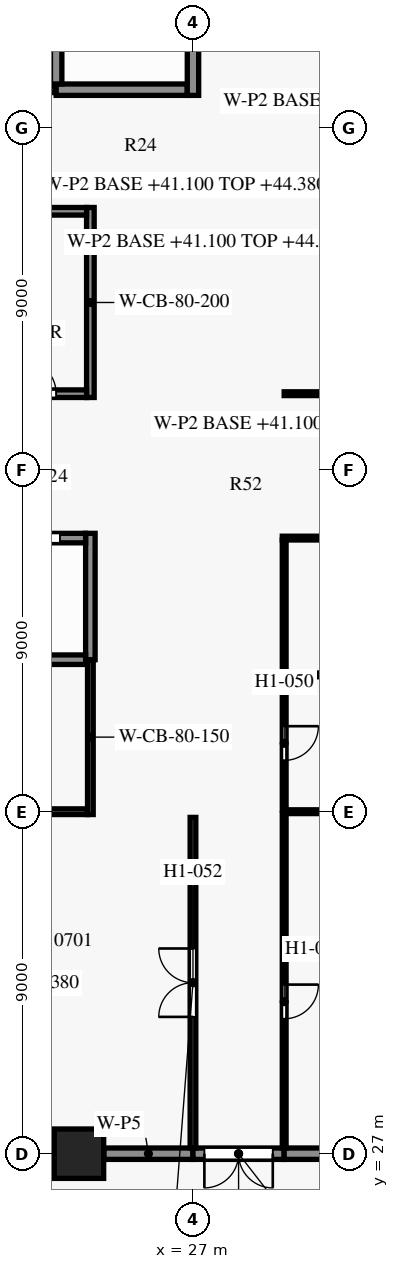
"""IFC4 building model, lengths in metres.
Left out: names, types, materials, properties, quantities, classifications, styles, units other than length and angle.
Written with IfcOpenShell. Run it as: python <this file> out.ifc"""

import sys

from ifc_helpers import new_model, si_unit, direction, frame, frame_2d, origin, origin_2d, place, context, subcontext, project, spatial, rectangle, extrude, element, fill, save


model = new_model("IFC4")
c1 = context("Model", 3, precision=1e-05, world=origin(), true_north=direction((0.0, 1.0)))
c2 = subcontext(c1, "Body", "Model", "MODEL_VIEW")
j1 = project(units=[si_unit("LENGTHUNIT", "METRE"), si_unit("PLANEANGLEUNIT", "RADIAN")], contexts=[c1])
p1 = place(None, origin())
s1 = spatial("IfcSite", under=j1, at=p1, CompositionType="ELEMENT")
p2 = place(p1, origin())
s2 = spatial("IfcBuilding", under=s1, at=p2, CompositionType="ELEMENT")
p3 = place(p2, frame((0.0, 0.0, 41.1)))
s3 = spatial("IfcBuildingStorey", under=s2, at=p3, CompositionType="ELEMENT", Elevation=41.1)
p4 = place(p3, frame((24.0, 27.0, 0.0), z_axis=(0.0, 0.0, 1.0), x_axis=(1.0, 0.0, 0.0)))
e1 = element("IfcColumn", 1, at=p4, inside=s3, PredefinedType="COLUMN", context=c2, shape_type="SweptSolid", body=[
    extrude(rectangle(XDim=1.3, YDim=1.3, at=origin_2d()), origin(), (0.0, 0.0, 1.0), 3.6),
])
p5 = place(p3, frame((12.4, 36.0, 0.0), z_axis=(0.0, 0.0, 1.0), x_axis=(1.0, 0.0, 0.0)))
e2 = element("IfcWall", 2, at=p5, inside=s3, PredefinedType="SHEAR", context=c2, shape_type="SweptSolid", body=[
    extrude(rectangle(XDim=11.825, YDim=0.15, at=frame_2d((5.913, 0.0))), origin(), (0.0, 0.0, 1.0), 3.3),
])
p6 = place(p5, frame((1.25, 0.0, 0.0)))
e3 = element("IfcOpeningElement", 3, at=p6, cuts=e2, PredefinedType="OPENING", context=c2, shape_type="SweptSolid", body=[
    extrude(rectangle(XDim=0.9, YDim=2.1, at=frame_2d((0.45, 1.05))), frame((0.0, 0.085, 0.0), z_axis=(0.0, -1.0, 0.0), x_axis=(1.0, 0.0, 0.0)), (0.0, 0.0, 1.0), 0.17),
])
p7 = place(p5, frame((5.2, 0.0, 0.0)))
e4 = element("IfcOpeningElement", 4, at=p7, cuts=e2, PredefinedType="OPENING", context=c2, shape_type="SweptSolid", body=[
    extrude(rectangle(XDim=0.9, YDim=2.1, at=frame_2d((0.45, 1.05))), frame((0.0, 0.085, 0.0), z_axis=(0.0, -1.0, 0.0), x_axis=(1.0, 0.0, 0.0)), (0.0, 0.0, 1.0), 0.17),
])
p8 = place(p5, frame((9.425, 0.0, 0.0)))
e5 = element("IfcOpeningElement", 5, at=p8, cuts=e2, PredefinedType="OPENING", context=c2, shape_type="SweptSolid", body=[
    extrude(rectangle(XDim=0.95, YDim=2.1, at=frame_2d((0.475, 1.05))), frame((0.0, 0.085, 0.0), z_axis=(0.0, -1.0, 0.0), x_axis=(1.0, 0.0, 0.0)), (0.0, 0.0, 1.0), 0.17),
])
p9 = place(p3, frame((8.1, 40.0, 0.0), z_axis=(0.0, 0.0, 1.0), x_axis=(1.0, 0.0, 0.0)))
e6 = element("IfcWall", 6, at=p9, inside=s3, PredefinedType="SHEAR", context=c2, shape_type="SweptSolid", body=[
    extrude(rectangle(XDim=16.075, YDim=0.25, at=frame_2d((8.038, 0.0))), origin(), (0.0, 0.0, 1.0), 3.3),
])
p10 = place(p3, frame((8.1, 43.2, 0.0), z_axis=(0.0, 0.0, 1.0), x_axis=(1.0, 0.0, 0.0)))
e7 = element("IfcWall", 7, at=p10, inside=s3, PredefinedType="SHEAR", context=c2, shape_type="SweptSolid", body=[
    extrude(rectangle(XDim=16.075, YDim=0.25, at=frame_2d((8.038, 0.0))), origin(), (0.0, 0.0, 1.0), 3.3),
])
p11 = place(p10, frame((14.3, 0.0, 0.0)))
e8 = element("IfcOpeningElement", 8, at=p11, cuts=e7, PredefinedType="OPENING", context=c2, shape_type="SweptSolid", body=[
    extrude(rectangle(XDim=1.1, YDim=2.1, at=frame_2d((0.55, 1.05))), frame((0.0, 0.135, 0.0), z_axis=(0.0, -1.0, 0.0), x_axis=(1.0, 0.0, 0.0)), (0.0, 0.0, 1.0), 0.27),
])
p12 = place(p10, frame((0.8, 0.0, 0.0)))
e9 = element("IfcOpeningElement", 9, at=p12, cuts=e7, PredefinedType="OPENING", context=c2, shape_type="SweptSolid", body=[
    extrude(rectangle(XDim=1.1, YDim=2.1, at=frame_2d((0.55, 1.05))), frame((0.0, 0.135, 0.0), z_axis=(0.0, -1.0, 0.0), x_axis=(1.0, 0.0, 0.0)), (0.0, 0.0, 1.0), 0.27),
])
p13 = place(p10, frame((3.5, 0.0, 0.0)))
e10 = element("IfcOpeningElement", 10, at=p13, cuts=e7, PredefinedType="OPENING", context=c2, shape_type="SweptSolid", body=[
    extrude(rectangle(XDim=1.1, YDim=2.1, at=frame_2d((0.55, 1.05))), frame((0.0, 0.135, 0.0), z_axis=(0.0, -1.0, 0.0), x_axis=(1.0, 0.0, 0.0)), (0.0, 0.0, 1.0), 0.27),
])
p14 = place(p10, frame((6.2, 0.0, 0.0)))
e11 = element("IfcOpeningElement", 11, at=p14, cuts=e7, PredefinedType="OPENING", context=c2, shape_type="SweptSolid", body=[
    extrude(rectangle(XDim=1.1, YDim=2.1, at=frame_2d((0.55, 1.05))), frame((0.0, 0.135, 0.0), z_axis=(0.0, -1.0, 0.0), x_axis=(1.0, 0.0, 0.0)), (0.0, 0.0, 1.0), 0.27),
])
p15 = place(p10, frame((8.9, 0.0, 0.0)))
e12 = element("IfcOpeningElement", 12, at=p15, cuts=e7, PredefinedType="OPENING", context=c2, shape_type="SweptSolid", body=[
    extrude(rectangle(XDim=1.1, YDim=2.1, at=frame_2d((0.55, 1.05))), frame((0.0, 0.135, 0.0), z_axis=(0.0, -1.0, 0.0), x_axis=(1.0, 0.0, 0.0)), (0.0, 0.0, 1.0), 0.27),
])
p16 = place(p10, frame((11.6, 0.0, 0.0)))
e13 = element("IfcOpeningElement", 13, at=p16, cuts=e7, PredefinedType="OPENING", context=c2, shape_type="SweptSolid", body=[
    extrude(rectangle(XDim=1.1, YDim=2.1, at=frame_2d((0.55, 1.05))), frame((0.0, 0.135, 0.0), z_axis=(0.0, -1.0, 0.0), x_axis=(1.0, 0.0, 0.0)), (0.0, 0.0, 1.0), 0.27),
])
p17 = place(p3, frame((21.6, 47.0, 0.0), z_axis=(0.0, 0.0, 1.0), x_axis=(1.0, 0.0, 0.0)))
e14 = element("IfcWall", 14, at=p17, inside=s3, PredefinedType="PARTITIONING", context=c2, shape_type="SweptSolid", body=[
    extrude(rectangle(XDim=2.6, YDim=0.2, at=frame_2d((1.3, 0.0))), origin(), (0.0, 0.0, 1.0), 3.3),
])
p18 = place(p17, frame((0.9, 0.0, 0.0)))
e15 = element("IfcOpeningElement", 15, at=p18, cuts=e14, PredefinedType="OPENING", context=c2, shape_type="SweptSolid", body=[
    extrude(rectangle(XDim=0.9, YDim=2.1, at=frame_2d((0.45, 1.05))), frame((0.0, 0.11, 0.0), z_axis=(0.0, -1.0, 0.0), x_axis=(1.0, 0.0, 0.0)), (0.0, 0.0, 1.0), 0.22),
])
p19 = place(p3, frame((21.6, 51.8, 0.0), z_axis=(0.0, 0.0, 1.0), x_axis=(1.0, 0.0, 0.0)))
e16 = element("IfcWall", 16, at=p19, inside=s3, PredefinedType="PARTITIONING", context=c2, shape_type="SweptSolid", body=[
    extrude(rectangle(XDim=2.6, YDim=0.2, at=frame_2d((1.3, 0.0))), origin(), (0.0, 0.0, 1.0), 3.3),
])
p20 = place(p3, frame((13.5, 55.0, 0.0), z_axis=(0.0, 0.0, 1.0), x_axis=(1.0, 0.0, 0.0)))
e17 = element("IfcWall", 17, at=p20, inside=s3, PredefinedType="PARTITIONING", context=c2, shape_type="SweptSolid", body=[
    extrude(rectangle(XDim=9.9, YDim=0.15, at=frame_2d((4.95, 0.0))), origin(), (0.0, 0.0, 1.0), 3.3),
])
p21 = place(p20, frame((4.45, 0.0, 0.0)))
e18 = element("IfcOpeningElement", 18, at=p21, cuts=e17, PredefinedType="OPENING", context=c2, shape_type="SweptSolid", body=[
    extrude(rectangle(XDim=1.0, YDim=2.1, at=frame_2d((0.5, 1.05))), frame((0.0, 0.085, 0.0), z_axis=(0.0, -1.0, 0.0), x_axis=(1.0, 0.0, 0.0)), (0.0, 0.0, 1.0), 0.17),
])
p22 = place(p3, frame((23.4, 55.0, 0.0), z_axis=(0.0, 0.0, 1.0), x_axis=(1.0, 0.0, 0.0)))
e19 = element("IfcWall", 19, at=p22, inside=s3, PredefinedType="SHEAR", context=c2, shape_type="SweptSolid", body=[
    extrude(rectangle(XDim=3.45, YDim=0.3, at=frame_2d((1.725, 0.0))), origin(), (0.0, 0.0, 1.0), 3.3),
])
p23 = place(p3, frame((23.4, 55.15, 0.0), z_axis=(0.0, 0.0, 1.0), x_axis=(0.0, 1.0, 0.0)))
e20 = element("IfcWall", 20, at=p23, inside=s3, PredefinedType="SHEAR", context=c2, shape_type="SweptSolid", body=[
    extrude(rectangle(XDim=8.0, YDim=0.3, at=frame_2d((4.0, 0.0))), origin(), (0.0, 0.0, 1.0), 3.3),
])
p24 = place(p3, frame((24.3, 35.925, 0.0), z_axis=(0.0, 0.0, 1.0), x_axis=(0.0, 1.0, 0.0)))
e21 = element("IfcWall", 21, at=p24, inside=s3, PredefinedType="SHEAR", context=c2, shape_type="SweptSolid", body=[
    extrude(rectangle(XDim=4.075, YDim=0.15, at=frame_2d((2.038, 0.0))), origin(), (0.0, 0.0, 1.0), 3.3),
])
p25 = place(p3, frame((24.3, 46.9, 0.0), z_axis=(0.0, 0.0, 1.0), x_axis=(0.0, 1.0, 0.0)))
e22 = element("IfcWall", 22, at=p25, inside=s3, PredefinedType="SHEAR", context=c2, shape_type="SweptSolid", body=[
    extrude(rectangle(XDim=5.0, YDim=0.2, at=frame_2d((2.5, 0.0))), origin(), (0.0, 0.0, 1.0), 3.3),
])
p26 = place(p3, frame((24.3, 40.0, 0.0), z_axis=(0.0, 0.0, 1.0), x_axis=(0.0, 1.0, 0.0)))
e23 = element("IfcWall", 23, at=p26, inside=s3, PredefinedType="SHEAR", context=c2, shape_type="SweptSolid", body=[
    extrude(rectangle(XDim=3.325, YDim=0.25, at=frame_2d((1.663, 0.0))), origin(), (0.0, 0.0, 1.0), 3.3),
])
p27 = place(p3, frame((27.0, 54.85, 0.0), z_axis=(0.0, 0.0, 1.0), x_axis=(0.0, 1.0, 0.0)))
e24 = element("IfcWall", 24, at=p27, inside=s3, PredefinedType="SHEAR", context=c2, shape_type="SweptSolid", body=[
    extrude(rectangle(XDim=8.35, YDim=0.3, at=frame_2d((4.175, 0.0))), origin(), (0.0, 0.0, 1.0), 3.3),
])
p28 = place(p27, frame((6.55, 0.0, 0.0)))
e25 = element("IfcOpeningElement", 25, at=p28, cuts=e24, PredefinedType="OPENING", context=c2, shape_type="SweptSolid", body=[
    extrude(rectangle(XDim=1.2, YDim=2.2, at=frame_2d((0.6, 1.1))), frame((0.0, 0.16, 0.0), z_axis=(0.0, -1.0, 0.0), x_axis=(1.0, 0.0, 0.0)), (0.0, 0.0, 1.0), 0.32),
])
p29 = place(p3, frame((23.345, 27.0, 0.0), z_axis=(0.0, 0.0, 1.0), x_axis=(-1.0, 0.0, 0.0)))
e26 = element("IfcWall", 26, at=p29, inside=s3, PredefinedType="PARTITIONING", context=c2, shape_type="SweptSolid", body=[
    extrude(rectangle(XDim=9.845, YDim=0.3, at=frame_2d((4.922, 0.0))), origin(), (0.0, 0.0, 1.0), 2.58),
])
p30 = place(p3, frame((27.0, 27.0, 0.0), z_axis=(0.0, 0.0, 1.0), x_axis=(-1.0, 0.0, 0.0)))
e27 = element("IfcWall", 27, at=p30, inside=s3, PredefinedType="PARTITIONING", context=c2, shape_type="SweptSolid", body=[
    extrude(rectangle(XDim=2.345, YDim=0.3, at=frame_2d((1.172, 0.0))), origin(), (0.0, 0.0, 1.0), 2.58),
])
p31 = place(p3, frame((29.4, 27.0, 0.0), z_axis=(0.0, 0.0, 1.0), x_axis=(-1.0, 0.0, 0.0)))
e28 = element("IfcWall", 28, at=p31, inside=s3, PredefinedType="PARTITIONING", context=c2, shape_type="SweptSolid", body=[
    extrude(rectangle(XDim=2.4, YDim=0.3, at=frame_2d((1.2, 0.0))), origin(), (0.0, 0.0, 1.0), 2.58),
])
p32 = place(p31, frame((0.3, 0.0, 0.0)))
e29 = element("IfcOpeningElement", 29, at=p32, cuts=e28, PredefinedType="OPENING", context=c2, shape_type="SweptSolid", body=[
    extrude(rectangle(XDim=1.8, YDim=2.1, at=frame_2d((0.9, 1.05))), frame((0.0, 0.16, 0.0), z_axis=(0.0, -1.0, 0.0), x_axis=(1.0, 0.0, 0.0)), (0.0, 0.0, 1.0), 0.32),
])
p33 = place(p3, frame((34.975, 27.0, 0.0), z_axis=(0.0, 0.0, 1.0), x_axis=(-1.0, 0.0, 0.0)))
e30 = element("IfcWall", 30, at=p33, inside=s3, PredefinedType="PARTITIONING", context=c2, shape_type="SweptSolid", body=[
    extrude(rectangle(XDim=5.575, YDim=0.3, at=frame_2d((2.788, 0.0))), origin(), (0.0, 0.0, 1.0), 2.58),
])
p34 = place(p3, frame((27.0, 27.15, 0.0), z_axis=(0.0, 0.0, 1.0), x_axis=(0.0, 1.0, 0.0)))
e31 = element("IfcWall", 31, at=p34, inside=s3, PredefinedType="PARTITIONING", context=c2, shape_type="SweptSolid", body=[
    extrude(rectangle(XDim=8.7, YDim=0.15, at=frame_2d((4.35, 0.0))), origin(), (0.0, 0.0, 1.0), 3.28),
])
p35 = place(p34, frame((3.45, 0.0, 0.0)))
e32 = element("IfcOpeningElement", 32, at=p35, cuts=e31, PredefinedType="OPENING", context=c2, shape_type="SweptSolid", body=[
    extrude(rectangle(XDim=1.8, YDim=2.1, at=frame_2d((0.9, 1.05))), frame((0.0, 0.085, 0.0), z_axis=(0.0, -1.0, 0.0), x_axis=(1.0, 0.0, 0.0)), (0.0, 0.0, 1.0), 0.17),
])
p36 = place(p3, frame((29.4, 35.95, 0.0), z_axis=(0.0, 0.0, 1.0), x_axis=(0.0, -1.0, 0.0)))
e33 = element("IfcWall", 33, at=p36, inside=s3, PredefinedType="PARTITIONING", context=c2, shape_type="SweptSolid", body=[
    extrude(rectangle(XDim=8.8, YDim=0.1, at=frame_2d((4.4, 0.0))), origin(), (0.0, 0.0, 1.0), 3.28),
])
p37 = place(p36, frame((4.5, 0.0, 0.0)))
e34 = element("IfcOpeningElement", 34, at=p37, cuts=e33, PredefinedType="OPENING", context=c2, shape_type="SweptSolid", body=[
    extrude(rectangle(XDim=0.9, YDim=2.1, at=frame_2d((0.45, 1.05))), frame((0.0, 0.06, 0.0), z_axis=(0.0, -1.0, 0.0), x_axis=(1.0, 0.0, 0.0)), (0.0, 0.0, 1.0), 0.12),
])
p38 = place(p3, frame((36.0, 36.0, 0.0), z_axis=(0.0, 0.0, 1.0), x_axis=(-1.0, 0.0, 0.0)))
e35 = element("IfcWall", 35, at=p38, inside=s3, PredefinedType="PARTITIONING", context=c2, shape_type="SweptSolid", body=[
    extrude(rectangle(XDim=6.55, YDim=0.1, at=frame_2d((3.275, 0.0))), origin(), (0.0, 0.0, 1.0), 2.58),
])
p39 = place(p3, frame((29.4, 39.55, 0.0), z_axis=(0.0, 0.0, 1.0), x_axis=(0.0, -1.0, 0.0)))
e36 = element("IfcWall", 36, at=p39, inside=s3, PredefinedType="PARTITIONING", context=c2, shape_type="SweptSolid", body=[
    extrude(rectangle(XDim=3.5, YDim=0.1, at=frame_2d((1.75, 0.0))), origin(), (0.0, 0.0, 1.0), 3.28),
])
p40 = place(p39, frame((1.3, 0.0, 0.0)))
e37 = element("IfcOpeningElement", 37, at=p40, cuts=e36, PredefinedType="OPENING", context=c2, shape_type="SweptSolid", body=[
    extrude(rectangle(XDim=0.9, YDim=2.1, at=frame_2d((0.45, 1.05))), frame((0.0, 0.06, 0.0), z_axis=(0.0, -1.0, 0.0), x_axis=(1.0, 0.0, 0.0)), (0.0, 0.0, 1.0), 0.12),
])
p41 = place(p3, frame((35.345, 39.6, 0.0), z_axis=(0.0, 0.0, 1.0), x_axis=(-1.0, 0.0, 0.0)))
e38 = element("IfcWall", 38, at=p41, inside=s3, PredefinedType="PARTITIONING", context=c2, shape_type="SweptSolid", body=[
    extrude(rectangle(XDim=5.895, YDim=0.1, at=frame_2d((2.948, 0.0))), origin(), (0.0, 0.0, 1.0), 3.28),
])
p42 = place(p3, frame((29.4, 43.15, 0.0), z_axis=(0.0, 0.0, 1.0), x_axis=(0.0, -1.0, 0.0)))
e39 = element("IfcWall", 39, at=p42, inside=s3, PredefinedType="PARTITIONING", context=c2, shape_type="SweptSolid", body=[
    extrude(rectangle(XDim=3.5, YDim=0.1, at=frame_2d((1.75, 0.0))), origin(), (0.0, 0.0, 1.0), 3.28),
])
p43 = place(p3, frame((35.85, 43.2, 0.0), z_axis=(0.0, 0.0, 1.0), x_axis=(-1.0, 0.0, 0.0)))
e40 = element("IfcWall", 40, at=p43, inside=s3, PredefinedType="PARTITIONING", context=c2, shape_type="SweptSolid", body=[
    extrude(rectangle(XDim=6.5, YDim=0.1, at=frame_2d((3.25, 0.0))), origin(), (0.0, 0.0, 1.0), 3.28),
])
p44 = place(p43, frame((2.7, 0.0, 0.0)))
e41 = element("IfcOpeningElement", 41, at=p44, cuts=e40, PredefinedType="OPENING", context=c2, shape_type="SweptSolid", body=[
    extrude(rectangle(XDim=0.9, YDim=2.1, at=frame_2d((0.45, 1.05))), frame((0.0, 0.06, 0.0), z_axis=(0.0, -1.0, 0.0), x_axis=(1.0, 0.0, 0.0)), (0.0, 0.0, 1.0), 0.12),
])
p45 = place(p3, frame((29.4, 47.0, 0.0), z_axis=(0.0, 0.0, 1.0), x_axis=(1.0, 0.0, 0.0)))
e42 = element("IfcWall", 42, at=p45, inside=s3, PredefinedType="PARTITIONING", context=c2, shape_type="SweptSolid", body=[
    extrude(rectangle(XDim=2.1, YDim=0.1, at=frame_2d((1.05, 0.0))), origin(), (0.0, 0.0, 1.0), 3.28),
])
p46 = place(p18, origin())
e43 = element("IfcDoor", 43, at=p46, inside=s3, OperationType="SINGLE_SWING_LEFT", PredefinedType="DOOR", context=c2, shape_type="SweptSolid", body=[
    extrude(rectangle(XDim=0.9, YDim=2.1, at=frame_2d((0.45, 1.05))), frame((0.0, 0.025, 0.0), z_axis=(0.0, -1.0, 0.0), x_axis=(1.0, 0.0, 0.0)), (0.0, 0.0, 1.0), 0.05),
])
fill(e15, e43)
p47 = place(p11, origin())
e44 = element("IfcDoor", 44, at=p47, inside=s3, OperationType="DOUBLE_DOOR_SLIDING", PredefinedType="DOOR", context=c2, shape_type="SweptSolid", body=[
    extrude(rectangle(XDim=1.1, YDim=2.1, at=frame_2d((0.55, 1.05))), frame((0.0, 0.025, 0.0), z_axis=(0.0, -1.0, 0.0), x_axis=(1.0, 0.0, 0.0)), (0.0, 0.0, 1.0), 0.05),
])
fill(e8, e44)
p48 = place(p40, origin())
e45 = element("IfcDoor", 45, at=p48, inside=s3, OperationType="SINGLE_SWING_RIGHT", PredefinedType="DOOR", context=c2, shape_type="SweptSolid", body=[
    extrude(rectangle(XDim=0.9, YDim=2.1, at=frame_2d((0.45, 1.05))), frame((0.0, 0.025, 0.0), z_axis=(0.0, -1.0, 0.0), x_axis=(1.0, 0.0, 0.0)), (0.0, 0.0, 1.0), 0.05),
])
fill(e37, e45)
p49 = place(p37, origin())
e46 = element("IfcDoor", 46, at=p49, inside=s3, OperationType="SINGLE_SWING_LEFT", PredefinedType="DOOR", context=c2, shape_type="SweptSolid", body=[
    extrude(rectangle(XDim=0.9, YDim=2.1, at=frame_2d((0.45, 1.05))), frame((0.0, 0.025, 0.0), z_axis=(0.0, -1.0, 0.0), x_axis=(1.0, 0.0, 0.0)), (0.0, 0.0, 1.0), 0.05),
])
fill(e34, e46)
p50 = place(p35, origin())
e47 = element("IfcDoor", 47, at=p50, inside=s3, OperationType="DOUBLE_DOOR_SINGLE_SWING", PredefinedType="DOOR", context=c2, shape_type="SweptSolid", body=[
    extrude(rectangle(XDim=1.8, YDim=2.1, at=frame_2d((0.9, 1.05))), frame((0.0, 0.025, 0.0), z_axis=(0.0, -1.0, 0.0), x_axis=(1.0, 0.0, 0.0)), (0.0, 0.0, 1.0), 0.05),
])
fill(e32, e47)
p51 = place(p32, origin())
e48 = element("IfcDoor", 48, at=p51, inside=s3, OperationType="DOUBLE_DOOR_SINGLE_SWING", PredefinedType="DOOR", context=c2, shape_type="SweptSolid", body=[
    extrude(rectangle(XDim=1.8, YDim=2.1, at=frame_2d((0.9, 1.05))), frame((0.0, 0.025, 0.0), z_axis=(0.0, -1.0, 0.0), x_axis=(1.0, 0.0, 0.0)), (0.0, 0.0, 1.0), 0.05),
])
fill(e29, e48)
save(model, sys.argv[1])
